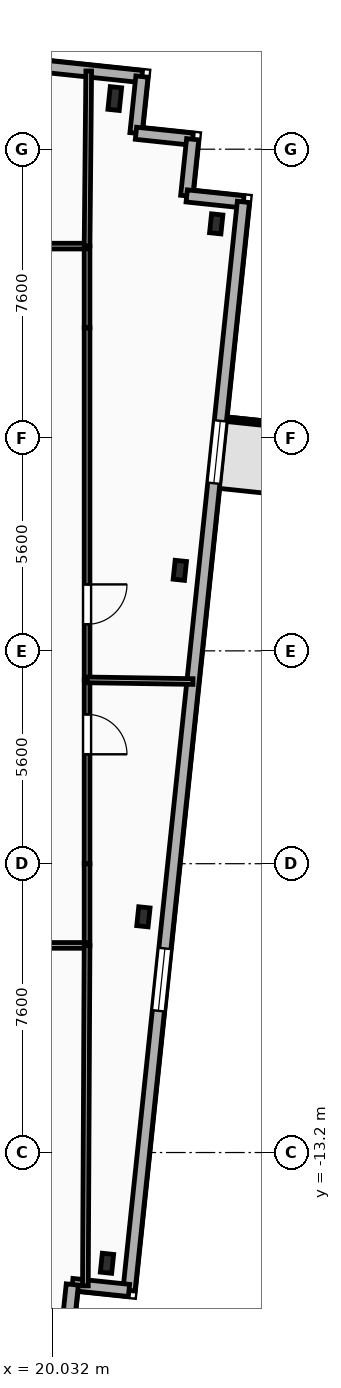
"""IFC4 building model, lengths in metres.
Left out: names, types, materials, properties, quantities, classifications, styles, units other than length and angle.
Written with IfcOpenShell. Run it as: python <this file> out.ifc"""

import sys

from ifc_helpers import new_model, si_unit, direction, frame, frame_2d, origin, origin_2d, place, context, subcontext, project, spatial, rectangle, i_section, extrude, element, fill, save


model = new_model("IFC4")
c1 = context("Model", 3, precision=1e-05, world=origin(), true_north=direction((0.0, 1.0)))
c2 = subcontext(c1, "Body", "Model", "MODEL_VIEW")
j1 = project(units=[si_unit("LENGTHUNIT", "METRE"), si_unit("PLANEANGLEUNIT", "RADIAN")], contexts=[c1])
p1 = place(None, origin())
s1 = spatial("IfcSite", under=j1, at=p1, CompositionType="ELEMENT")
p2 = place(p1, origin())
s2 = spatial("IfcBuilding", under=s1, at=p2, CompositionType="ELEMENT")
p3 = place(p2, frame((0.0, 0.0, 216.5)))
s3 = spatial("IfcBuildingStorey", under=s2, at=p3, CompositionType="ELEMENT", Elevation=216.5)
p4 = place(p3, frame((21.679, 14.532, 0.0), z_axis=(0.0, 0.0, 1.0), x_axis=(0.994521895368, -0.104528463268, 0.0)))
e1 = element("IfcColumn", 1, at=p4, inside=s3, PredefinedType="COLUMN", context=c2, shape_type="SweptSolid", body=[
    extrude(i_section(OverallWidth=0.3, OverallDepth=0.6, WebThickness=0.015, FlangeThickness=0.03, FilletRadius=0.027, at=origin_2d()), origin(), (0.0, 0.0, 1.0), 3.35),
])
for number, where, z_axis, x_axis in (
    (2, (21.474, -16.114, 0.0), (0.0, 0.0, 1.0), (0.995, -0.105, 0.0)),
    (3, (22.433, -6.998, 0.0), (0.0, 0.0, 1.0), (0.995, -0.105, 0.0)),
    (4, (23.391, 2.119, 0.0), (0.0, 0.0, 1.0), (0.995, -0.105, 0.0)),
    (5, (24.349, 11.235, 0.0), (0.0, 0.0, 1.0), (0.995, -0.105, 0.0)),
):
    element("IfcColumn", number, at=place(p3, frame(where, z_axis=z_axis, x_axis=x_axis)), inside=s3, PredefinedType="COLUMN", context=c2, shape_type="SweptSolid", body=[
        extrude(i_section(OverallWidth=0.3, OverallDepth=0.5, WebThickness=0.014, FlangeThickness=0.028, FilletRadius=0.027, at=origin_2d()), origin(), (0.0, 0.0, 1.0), 3.35),
    ])
p5 = place(p3, frame((-23.156, 19.898, 0.0), z_axis=(0.0, 0.0, 1.0), x_axis=(0.994522001802, -0.104527450613, 0.0)))
e6 = element("IfcWall", 6, at=p5, inside=s3, PredefinedType="SOLIDWALL", context=c2, shape_type="SweptSolid", body=[
    extrude(rectangle(XDim=45.8, YDim=0.32, at=frame_2d((22.9, 0.0))), origin(), (0.0, 0.0, 1.0), 3.04),
])
p6 = place(p5, frame((4.9, 0.0, 0.85)))
e7 = element("IfcOpeningElement", 7, at=p6, cuts=e6, PredefinedType="OPENING", context=c2, shape_type="SweptSolid", body=[
    extrude(rectangle(XDim=1.65, YDim=1.85, at=frame_2d((0.825, 0.925))), frame((0.0, 0.17, 0.0), z_axis=(0.0, -1.0, 0.0), x_axis=(1.0, 0.0, 0.0)), (0.0, 0.0, 1.0), 0.34),
])
p7 = place(p5, frame((11.706, 0.0, 0.85)))
e8 = element("IfcOpeningElement", 8, at=p7, cuts=e6, PredefinedType="OPENING", context=c2, shape_type="SweptSolid", body=[
    extrude(rectangle(XDim=1.65, YDim=1.85, at=frame_2d((0.825, 0.925))), frame((0.0, 0.17, 0.0), z_axis=(0.0, -1.0, 0.0), x_axis=(1.0, 0.0, 0.0)), (0.0, 0.0, 1.0), 0.34),
])
p8 = place(p5, frame((23.381, 0.0, 0.85)))
e9 = element("IfcOpeningElement", 9, at=p8, cuts=e6, PredefinedType="OPENING", context=c2, shape_type="SweptSolid", body=[
    extrude(rectangle(XDim=1.6, YDim=1.85, at=frame_2d((0.8, 0.925))), frame((0.0, 0.17, 0.0), z_axis=(0.0, -1.0, 0.0), x_axis=(1.0, 0.0, 0.0)), (0.0, 0.0, 1.0), 0.34),
])
p9 = place(p5, frame((34.628, 0.0, 0.85)))
e10 = element("IfcOpeningElement", 10, at=p9, cuts=e6, PredefinedType="OPENING", context=c2, shape_type="SweptSolid", body=[
    extrude(rectangle(XDim=1.65, YDim=1.85, at=frame_2d((0.825, 0.925))), frame((0.0, 0.17, 0.0), z_axis=(0.0, -1.0, 0.0), x_axis=(1.0, 0.0, 0.0)), (0.0, 0.0, 1.0), 0.34),
])
p10 = place(p3, frame((22.393, 15.111, 0.0), z_axis=(0.0, 0.0, 1.0), x_axis=(-0.104481464157, -0.994526834051, 0.0)))
e11 = element("IfcWall", 11, at=p10, inside=s3, PredefinedType="SOLIDWALL", context=c2, shape_type="SweptSolid", body=[
    extrude(rectangle(XDim=1.5, YDim=0.32, at=frame_2d((0.75, 0.0))), origin(), (0.0, 0.0, 1.0), 3.04),
])
for number, where, z_axis, x_axis in (
    (12, (22.237, 13.619, 0.0), (0.0, 0.0, 1.0), (0.995, -0.104, 0.0)),
    (13, (23.728, 13.462, 0.0), (0.0, 0.0, 1.0), (-0.104, -0.995, 0.0)),
    (14, (23.572, 11.971, 0.0), (0.0, 0.0, 1.0), (0.995, -0.105, 0.0)),
):
    element("IfcWall", number, at=place(p3, frame(where, z_axis=z_axis, x_axis=x_axis)), inside=s3, PredefinedType="SOLIDWALL", context=c2, shape_type="SweptSolid", body=[
        extrude(rectangle(XDim=1.5, YDim=0.32, at=frame_2d((0.75, 0.0))), origin(), (0.0, 0.0, 1.0), 3.04),
    ])
p11 = place(p3, frame((25.063, 11.814, 0.0), z_axis=(0.0, 0.0, 1.0), x_axis=(-0.104523275986, -0.99452244056, 0.0)))
e15 = element("IfcWall", 15, at=p11, inside=s3, PredefinedType="SOLIDWALL", context=c2, shape_type="SweptSolid", body=[
    extrude(rectangle(XDim=28.8, YDim=0.32, at=frame_2d((14.4, 0.0))), origin(), (0.0, 0.0, 1.0), 3.04),
])
p12 = place(p11, frame((5.793, 0.0, 0.85)))
e16 = element("IfcOpeningElement", 16, at=p12, cuts=e15, PredefinedType="OPENING", context=c2, shape_type="SweptSolid", body=[
    extrude(rectangle(XDim=1.65, YDim=1.85, at=frame_2d((0.825, 0.925))), frame((0.0, 0.17, 0.0), z_axis=(0.0, -1.0, 0.0), x_axis=(1.0, 0.0, 0.0)), (0.0, 0.0, 1.0), 0.34),
])
p13 = place(p11, frame((19.752, 0.0, 0.85)))
e17 = element("IfcOpeningElement", 17, at=p13, cuts=e15, PredefinedType="OPENING", context=c2, shape_type="SweptSolid", body=[
    extrude(rectangle(XDim=1.65, YDim=1.85, at=frame_2d((0.825, 0.925))), frame((0.0, 0.17, 0.0), z_axis=(0.0, -1.0, 0.0), x_axis=(1.0, 0.0, 0.0)), (0.0, 0.0, 1.0), 0.34),
])
p14 = place(p3, frame((22.053, -16.828, 0.0), z_axis=(0.0, 0.0, 1.0), x_axis=(-0.994526834051, 0.104481464157, 0.0)))
e18 = element("IfcWall", 18, at=p14, inside=s3, PredefinedType="SOLIDWALL", context=c2, shape_type="SweptSolid", body=[
    extrude(rectangle(XDim=1.5, YDim=0.32, at=frame_2d((0.75, 0.0))), origin(), (0.0, 0.0, 1.0), 3.04),
])
p15 = place(p3, frame((20.561, -16.672, 0.0), z_axis=(0.0, 0.0, 1.0), x_axis=(-0.104498377516, -0.994525057048, 0.0)))
e19 = element("IfcWall", 19, at=p15, inside=s3, PredefinedType="SOLIDWALL", context=c2, shape_type="SweptSolid", body=[
    extrude(rectangle(XDim=1.5, YDim=0.32, at=frame_2d((0.75, 0.0))), origin(), (0.0, 0.0, 1.0), 3.04),
])
p16 = place(p3, frame((20.95, 10.65, 0.0), z_axis=(0.0, 0.0, 1.0), x_axis=(0.0, -1.0, 0.0)))
e20 = element("IfcWall", 20, at=p16, inside=s3, PredefinedType="PARTITIONING", context=c2, shape_type="SweptSolid", body=[
    extrude(rectangle(XDim=2.15, YDim=0.15, at=frame_2d((1.075, 0.0))), origin(), (0.0, 0.0, 1.0), 3.04),
])
p17 = place(p3, frame((6.583, 10.65, 0.0), z_axis=(0.0, 0.0, 1.0), x_axis=(1.0, 0.0, 0.0)))
e21 = element("IfcWall", 21, at=p17, inside=s3, PredefinedType="PARTITIONING", context=c2, shape_type="SweptSolid", body=[
    extrude(rectangle(XDim=14.367, YDim=0.15, at=frame_2d((7.184, 0.0))), origin(), (0.0, 0.0, 1.0), 3.04),
])
p18 = place(p17, frame((9.698, 0.0, 0.0)))
e22 = element("IfcOpeningElement", 22, at=p18, cuts=e21, PredefinedType="OPENING", context=c2, shape_type="SweptSolid", body=[
    extrude(rectangle(XDim=1.05, YDim=2.15, at=frame_2d((0.525, 1.075))), frame((0.0, 0.085, 0.0), z_axis=(0.0, -1.0, 0.0), x_axis=(1.0, 0.0, 0.0)), (0.0, 0.0, 1.0), 0.17),
])
p19 = place(p3, frame((20.95, -5.6, 0.0), z_axis=(0.0, 0.0, 1.0), x_axis=(0.0, -1.0, 0.0)))
e23 = element("IfcWall", 23, at=p19, inside=s3, PredefinedType="PARTITIONING", context=c2, shape_type="SweptSolid", body=[
    extrude(rectangle(XDim=2.15, YDim=0.15, at=frame_2d((1.075, 0.0))), origin(), (0.0, 0.0, 1.0), 3.04),
])
p20 = place(p3, frame((20.95, -7.75, 0.0), z_axis=(0.0, 0.0, 1.0), x_axis=(-1.0, 0.0, 0.0)))
e24 = element("IfcWall", 24, at=p20, inside=s3, PredefinedType="PARTITIONING", context=c2, shape_type="SweptSolid", body=[
    extrude(rectangle(XDim=6.583, YDim=0.15, at=frame_2d((3.292, 0.0))), origin(), (0.0, 0.0, 1.0), 3.04),
])
p21 = place(p20, frame((4.406, 0.0, 0.0)))
e25 = element("IfcOpeningElement", 25, at=p21, cuts=e24, PredefinedType="OPENING", context=c2, shape_type="SweptSolid", body=[
    extrude(rectangle(XDim=1.05, YDim=2.15, at=frame_2d((0.525, 1.075))), frame((0.0, 0.085, 0.0), z_axis=(0.0, -1.0, 0.0), x_axis=(1.0, 0.0, 0.0)), (0.0, 0.0, 1.0), 0.17),
])
p22 = place(p3, frame((20.95, -0.763, 0.0), z_axis=(0.0, 0.0, 1.0), x_axis=(0.0, -1.0, 0.0)))
e26 = element("IfcWall", 26, at=p22, inside=s3, PredefinedType="PARTITIONING", context=c2, shape_type="SweptSolid", body=[
    extrude(rectangle(XDim=4.837, YDim=0.15, at=frame_2d((2.418, 0.0))), origin(), (0.0, 0.0, 1.0), 2.695),
])
p23 = place(p22, frame((0.908, 0.0, 0.0)))
e27 = element("IfcOpeningElement", 27, at=p23, cuts=e26, PredefinedType="OPENING", context=c2, shape_type="SweptSolid", body=[
    extrude(rectangle(XDim=1.05, YDim=2.15, at=frame_2d((0.525, 1.075))), frame((0.0, 0.085, 0.0), z_axis=(0.0, -1.0, 0.0), x_axis=(1.0, 0.0, 0.0)), (0.0, 0.0, 1.0), 0.17),
])
p24 = place(p3, frame((20.95, 8.5, 0.0), z_axis=(0.0, 0.0, 1.0), x_axis=(0.0, -1.0, 0.0)))
e28 = element("IfcWall", 28, at=p24, inside=s3, PredefinedType="PARTITIONING", context=c2, shape_type="SweptSolid", body=[
    extrude(rectangle(XDim=9.263, YDim=0.15, at=frame_2d((4.632, 0.0))), origin(), (0.0, 0.0, 1.0), 2.695),
])
p25 = place(p24, frame((6.751, 0.0, 0.0)))
e29 = element("IfcOpeningElement", 29, at=p25, cuts=e28, PredefinedType="OPENING", context=c2, shape_type="SweptSolid", body=[
    extrude(rectangle(XDim=1.05, YDim=2.15, at=frame_2d((0.525, 1.075))), frame((0.0, 0.085, 0.0), z_axis=(0.0, -1.0, 0.0), x_axis=(1.0, 0.0, 0.0)), (0.0, 0.0, 1.0), 0.17),
])
p26 = place(p3, frame((20.95, -0.763, 0.0), z_axis=(0.0, 0.0, 1.0), x_axis=(0.999875696831, -0.015766765259, 0.0)))
e30 = element("IfcWall", 30, at=p26, inside=s3, PredefinedType="PARTITIONING", context=c2, shape_type="SweptSolid", body=[
    extrude(rectangle(XDim=2.787, YDim=0.15, at=frame_2d((1.394, 0.0))), origin(), (0.0, 0.0, 1.0), 3.04),
])
p27 = place(p3, frame((20.906, -16.708, 0.0), z_axis=(0.0, 0.0, 1.0), x_axis=(0.004905642486, 0.999987967264, 0.0)))
e31 = element("IfcWall", 31, at=p27, inside=s3, PredefinedType="PARTITIONING", context=c2, shape_type="SweptSolid", body=[
    extrude(rectangle(XDim=8.958, YDim=0.15, at=frame_2d((4.479, 0.0))), origin(), (0.0, 0.0, 1.0), 2.665),
])
p28 = place(p3, frame((20.95, 10.65, 0.0), z_axis=(0.0, 0.0, 1.0), x_axis=(0.009535990233, 0.999954531411, 0.0)))
e32 = element("IfcWall", 32, at=p28, inside=s3, PredefinedType="PARTITIONING", context=c2, shape_type="SweptSolid", body=[
    extrude(rectangle(XDim=4.608, YDim=0.15, at=frame_2d((2.304, 0.0))), origin(), (0.0, 0.0, 1.0), 2.665),
])
p29 = place(p12, origin())
e33 = element("IfcWindow", 33, at=p29, inside=s3, PartitioningType="SINGLE_PANEL", PredefinedType="WINDOW", context=c2, shape_type="SweptSolid", body=[
    extrude(rectangle(XDim=1.65, YDim=1.85, at=frame_2d((0.825, 0.925))), frame((0.0, 0.03, 0.0), z_axis=(0.0, -1.0, 0.0), x_axis=(1.0, 0.0, 0.0)), (0.0, 0.0, 1.0), 0.06),
])
fill(e16, e33)
p30 = place(p13, origin())
e34 = element("IfcWindow", 34, at=p30, inside=s3, PartitioningType="SINGLE_PANEL", PredefinedType="WINDOW", context=c2, shape_type="SweptSolid", body=[
    extrude(rectangle(XDim=1.65, YDim=1.85, at=frame_2d((0.825, 0.925))), frame((0.0, 0.03, 0.0), z_axis=(0.0, -1.0, 0.0), x_axis=(1.0, 0.0, 0.0)), (0.0, 0.0, 1.0), 0.06),
])
fill(e17, e34)
p31 = place(p23, origin())
e35 = element("IfcDoor", 35, at=p31, inside=s3, OperationType="SINGLE_SWING_RIGHT", PredefinedType="DOOR", context=c2, shape_type="SweptSolid", body=[
    extrude(rectangle(XDim=1.05, YDim=2.15, at=frame_2d((0.525, 1.075))), frame((0.0, 0.025, 0.0), z_axis=(0.0, -1.0, 0.0), x_axis=(1.0, 0.0, 0.0)), (0.0, 0.0, 1.0), 0.05),
])
fill(e27, e35)
p32 = place(p25, origin())
e36 = element("IfcDoor", 36, at=p32, inside=s3, OperationType="SINGLE_SWING_LEFT", PredefinedType="DOOR", context=c2, shape_type="SweptSolid", body=[
    extrude(rectangle(XDim=1.05, YDim=2.15, at=frame_2d((0.525, 1.075))), frame((0.0, 0.025, 0.0), z_axis=(0.0, -1.0, 0.0), x_axis=(1.0, 0.0, 0.0)), (0.0, 0.0, 1.0), 0.05),
])
fill(e29, e36)
save(model, sys.argv[1])
